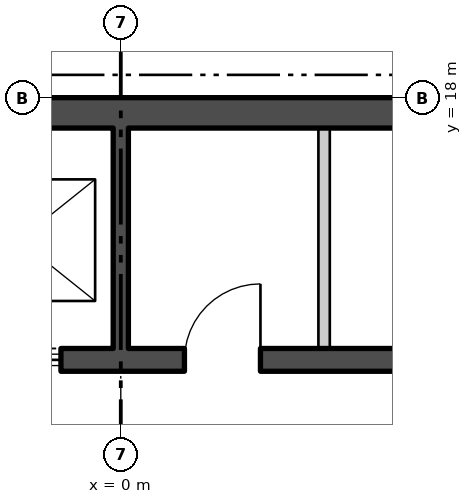
"""IFC4 building model, lengths in metres.
Left out: names, types, materials, properties, quantities, classifications, styles, units other than length and angle.
Written with IfcOpenShell. Run it as: python <this file> out.ifc"""

import sys

from ifc_helpers import new_model, si_unit, direction, frame, frame_2d, origin, place, context, subcontext, project, spatial, polyline, rectangle, outline, extrude, element, fill, save


model = new_model("IFC4")
c1 = context("Model", 3, precision=1e-05, world=origin(), true_north=direction((0.0, 1.0)))
c2 = subcontext(c1, "Body", "Model", "MODEL_VIEW")
j1 = project(units=[si_unit("LENGTHUNIT", "METRE"), si_unit("PLANEANGLEUNIT", "RADIAN")], contexts=[c1])
p1 = place(None, origin())
s1 = spatial("IfcSite", under=j1, at=p1, CompositionType="ELEMENT")
p2 = place(p1, origin())
s2 = spatial("IfcBuilding", under=s1, at=p2, CompositionType="ELEMENT")
p3 = place(p2, frame((0.0, 0.0, 329.4)))
s3 = spatial("IfcBuildingStorey", under=s2, at=p3, CompositionType="ELEMENT", Elevation=329.4)
p4 = place(p3, frame((1.9, -22.92, -0.18), z_axis=(0.0, 0.0, 1.0), x_axis=(0.500000141277, 0.866025322218, 0.0)))
e1 = element("IfcWall", 1, at=p4, inside=s3, PredefinedType="SOLIDWALL", context=c2, shape_type="SweptSolid", body=[
    extrude(outline(polyline([(-0.13, -0.225), (45.86, -0.225), (45.6, 0.225), (0.13, 0.225), (-0.13, -0.225)])), origin(), (0.0, 0.0, 1.0), 3.98),
])
p5 = place(p4, frame((1.424, 0.0, 1.08)))
e2 = element("IfcOpeningElement", 2, at=p5, cuts=e1, PredefinedType="OPENING", context=c2, shape_type="SweptSolid", body=[
    extrude(rectangle(XDim=2.4, YDim=2.3, at=frame_2d((1.2, 1.15))), frame((0.0, 0.235, 0.0), z_axis=(0.0, -1.0, 0.0), x_axis=(1.0, 0.0, 0.0)), (0.0, 0.0, 1.0), 0.47),
])
p6 = place(p4, frame((5.892, 0.0, 1.08)))
e3 = element("IfcOpeningElement", 3, at=p6, cuts=e1, PredefinedType="OPENING", context=c2, shape_type="SweptSolid", body=[
    extrude(rectangle(XDim=2.4, YDim=2.3, at=frame_2d((1.2, 1.15))), frame((0.0, 0.235, 0.0), z_axis=(0.0, -1.0, 0.0), x_axis=(1.0, 0.0, 0.0)), (0.0, 0.0, 1.0), 0.47),
])
p7 = place(p4, frame((14.905, 0.0, 1.08)))
e4 = element("IfcOpeningElement", 4, at=p7, cuts=e1, PredefinedType="OPENING", context=c2, shape_type="SweptSolid", body=[
    extrude(rectangle(XDim=2.4, YDim=2.3, at=frame_2d((1.2, 1.15))), frame((0.0, 0.235, 0.0), z_axis=(0.0, -1.0, 0.0), x_axis=(1.0, 0.0, 0.0)), (0.0, 0.0, 1.0), 0.47),
])
p8 = place(p4, frame((19.412, 0.0, 1.08)))
e5 = element("IfcOpeningElement", 5, at=p8, cuts=e1, PredefinedType="OPENING", context=c2, shape_type="SweptSolid", body=[
    extrude(rectangle(XDim=2.4, YDim=2.3, at=frame_2d((1.2, 1.15))), frame((0.0, 0.235, 0.0), z_axis=(0.0, -1.0, 0.0), x_axis=(1.0, 0.0, 0.0)), (0.0, 0.0, 1.0), 0.47),
])
p9 = place(p4, frame((23.918, 0.0, 1.08)))
e6 = element("IfcOpeningElement", 6, at=p9, cuts=e1, PredefinedType="OPENING", context=c2, shape_type="SweptSolid", body=[
    extrude(rectangle(XDim=2.4, YDim=2.3, at=frame_2d((1.2, 1.15))), frame((0.0, 0.235, 0.0), z_axis=(0.0, -1.0, 0.0), x_axis=(1.0, 0.0, 0.0)), (0.0, 0.0, 1.0), 0.47),
])
p10 = place(p4, frame((32.932, 0.0, 1.08)))
e7 = element("IfcOpeningElement", 7, at=p10, cuts=e1, PredefinedType="OPENING", context=c2, shape_type="SweptSolid", body=[
    extrude(rectangle(XDim=2.4, YDim=2.3, at=frame_2d((1.2, 1.15))), frame((0.0, 0.235, 0.0), z_axis=(0.0, -1.0, 0.0), x_axis=(1.0, 0.0, 0.0)), (0.0, 0.0, 1.0), 0.47),
])
p11 = place(p4, frame((37.438, 0.0, 1.08)))
e8 = element("IfcOpeningElement", 8, at=p11, cuts=e1, PredefinedType="OPENING", context=c2, shape_type="SweptSolid", body=[
    extrude(rectangle(XDim=2.4, YDim=2.3, at=frame_2d((1.2, 1.15))), frame((0.0, 0.235, 0.0), z_axis=(0.0, -1.0, 0.0), x_axis=(1.0, 0.0, 0.0)), (0.0, 0.0, 1.0), 0.47),
])
p12 = place(p4, frame((41.907, 0.0, 1.08)))
e9 = element("IfcOpeningElement", 9, at=p12, cuts=e1, PredefinedType="OPENING", context=c2, shape_type="SweptSolid", body=[
    extrude(rectangle(XDim=2.4, YDim=2.3, at=frame_2d((1.2, 1.15))), frame((0.0, 0.235, 0.0), z_axis=(0.0, -1.0, 0.0), x_axis=(1.0, 0.0, 0.0)), (0.0, 0.0, 1.0), 0.47),
])
p13 = place(p3, frame((-14.5, 17.8, 0.0), z_axis=(0.0, 0.0, 1.0), x_axis=(1.0, 0.0, 0.0)))
e10 = element("IfcWall", 10, at=p13, inside=s3, PredefinedType="SHEAR", context=c2, shape_type="SweptSolid", body=[
    extrude(rectangle(XDim=29.0, YDim=0.4, at=frame_2d((14.5, 0.0))), origin(), (0.0, 0.0, 1.0), 4.0),
])
p14 = place(p3, frame((-10.7, 14.55, 0.0), z_axis=(0.0, 0.0, 1.0), x_axis=(1.0, 0.0, 0.0)))
e11 = element("IfcWall", 11, at=p14, inside=s3, PredefinedType="SHEAR", context=c2, shape_type="SweptSolid", body=[
    extrude(rectangle(XDim=21.4, YDim=0.3, at=frame_2d((10.7, 0.0))), origin(), (0.0, 0.0, 1.0), 4.0),
])
p15 = place(p14, frame((0.738, 0.0, 0.0)))
e12 = element("IfcOpeningElement", 12, at=p15, cuts=e11, PredefinedType="OPENING", context=c2, shape_type="SweptSolid", body=[
    extrude(rectangle(XDim=1.1, YDim=2.1, at=frame_2d((0.55, 1.05))), frame((0.0, 0.16, 0.0), z_axis=(0.0, -1.0, 0.0), x_axis=(1.0, 0.0, 0.0)), (0.0, 0.0, 1.0), 0.32),
])
p16 = place(p14, frame((3.462, 0.0, 0.0)))
e13 = element("IfcOpeningElement", 13, at=p16, cuts=e11, PredefinedType="OPENING", context=c2, shape_type="SweptSolid", body=[
    extrude(rectangle(XDim=1.1, YDim=2.1, at=frame_2d((0.55, 1.05))), frame((0.0, 0.16, 0.0), z_axis=(0.0, -1.0, 0.0), x_axis=(1.0, 0.0, 0.0)), (0.0, 0.0, 1.0), 0.32),
])
p17 = place(p14, frame((6.138, 0.0, 0.0)))
e14 = element("IfcOpeningElement", 14, at=p17, cuts=e11, PredefinedType="OPENING", context=c2, shape_type="SweptSolid", body=[
    extrude(rectangle(XDim=1.1, YDim=2.1, at=frame_2d((0.55, 1.05))), frame((0.0, 0.16, 0.0), z_axis=(0.0, -1.0, 0.0), x_axis=(1.0, 0.0, 0.0)), (0.0, 0.0, 1.0), 0.32),
])
p18 = place(p14, frame((8.812, 0.0, 0.0)))
e15 = element("IfcOpeningElement", 15, at=p18, cuts=e11, PredefinedType="OPENING", context=c2, shape_type="SweptSolid", body=[
    extrude(rectangle(XDim=1.1, YDim=2.1, at=frame_2d((0.55, 1.05))), frame((0.0, 0.16, 0.0), z_axis=(0.0, -1.0, 0.0), x_axis=(1.0, 0.0, 0.0)), (0.0, 0.0, 1.0), 0.32),
])
p19 = place(p14, frame((19.562, 0.0, 0.0)))
e16 = element("IfcOpeningElement", 16, at=p19, cuts=e11, PredefinedType="OPENING", context=c2, shape_type="SweptSolid", body=[
    extrude(rectangle(XDim=1.1, YDim=2.1, at=frame_2d((0.55, 1.05))), frame((0.0, 0.16, 0.0), z_axis=(0.0, -1.0, 0.0), x_axis=(1.0, 0.0, 0.0)), (0.0, 0.0, 1.0), 0.32),
])
p20 = place(p14, frame((11.537, 0.0, 0.0)))
e17 = element("IfcOpeningElement", 17, at=p20, cuts=e11, PredefinedType="OPENING", context=c2, shape_type="SweptSolid", body=[
    extrude(rectangle(XDim=1.0, YDim=2.1, at=frame_2d((0.5, 1.05))), frame((0.0, 0.16, 0.0), z_axis=(0.0, -1.0, 0.0), x_axis=(1.0, 0.0, 0.0)), (0.0, 0.0, 1.0), 0.32),
])
p21 = place(p14, frame((15.55, 0.0, 0.0)))
e18 = element("IfcOpeningElement", 18, at=p21, cuts=e11, PredefinedType="OPENING", context=c2, shape_type="SweptSolid", body=[
    extrude(rectangle(XDim=1.0, YDim=2.1, at=frame_2d((0.5, 1.05))), frame((0.0, 0.16, 0.0), z_axis=(0.0, -1.0, 0.0), x_axis=(1.0, 0.0, 0.0)), (0.0, 0.0, 1.0), 0.32),
])
p22 = place(p3, frame((0.0, 14.7, 0.0), z_axis=(0.0, 0.0, 1.0), x_axis=(0.0, 1.0, 0.0)))
e19 = element("IfcWall", 19, at=p22, inside=s3, PredefinedType="SHEAR", context=c2, shape_type="SweptSolid", body=[
    extrude(rectangle(XDim=2.9, YDim=0.2, at=frame_2d((1.45, 0.0))), origin(), (0.0, 0.0, 1.0), 4.0),
])
p23 = place(p3, frame((2.675, 14.7, 0.0), z_axis=(0.0, 0.0, 1.0), x_axis=(0.0, 1.0, 0.0)))
e20 = element("IfcWall", 20, at=p23, inside=s3, PredefinedType="PARTITIONING", context=c2, shape_type="SweptSolid", body=[
    extrude(rectangle(XDim=2.9, YDim=0.15, at=frame_2d((1.45, 0.0))), origin(), (0.0, 0.0, 1.0), 4.0),
])
p24 = place(p18, origin())
e21 = element("IfcDoor", 21, at=p24, inside=s3, OperationType="SLIDING_TO_LEFT", PredefinedType="DOOR", context=c2, shape_type="SweptSolid", body=[
    extrude(rectangle(XDim=1.1, YDim=2.1, at=frame_2d((0.55, 1.05))), frame((0.0, 0.025, 0.0), z_axis=(0.0, -1.0, 0.0), x_axis=(1.0, 0.0, 0.0)), (0.0, 0.0, 1.0), 0.05),
])
fill(e15, e21)
p25 = place(p20, origin())
e22 = element("IfcDoor", 22, at=p25, inside=s3, OperationType="SINGLE_SWING_LEFT", PredefinedType="DOOR", context=c2, shape_type="SweptSolid", body=[
    extrude(rectangle(XDim=1.0, YDim=2.1, at=frame_2d((0.5, 1.05))), frame((0.0, 0.025, 0.0), z_axis=(0.0, -1.0, 0.0), x_axis=(1.0, 0.0, 0.0)), (0.0, 0.0, 1.0), 0.05),
])
fill(e17, e22)
save(model, sys.argv[1])
